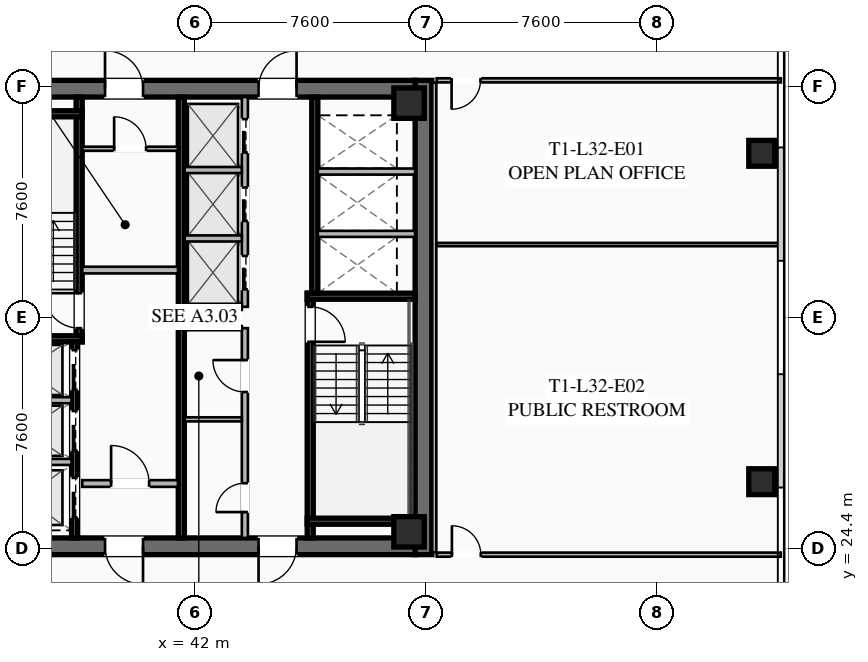
"""IFC4 building model, lengths in metres.
Left out: names, types, materials, properties, quantities, classifications, styles, units other than length and angle.
Written with IfcOpenShell. Run it as: python <this file> out.ifc"""

import sys

from ifc_helpers import new_model, si_unit, direction, frame, frame_2d, origin, origin_2d, place, context, subcontext, project, spatial, rectangle, hollow_rectangle, extrude, element, fill, save


model = new_model("IFC4")
c1 = context("Model", 3, precision=1e-05, world=origin(), true_north=direction((0.0, 1.0)))
c2 = subcontext(c1, "Body", "Model", "MODEL_VIEW")
j1 = project(units=[si_unit("LENGTHUNIT", "METRE"), si_unit("PLANEANGLEUNIT", "RADIAN")], contexts=[c1])
p1 = place(None, origin())
s1 = spatial("IfcSite", under=j1, at=p1, CompositionType="ELEMENT")
p2 = place(p1, origin())
s2 = spatial("IfcBuilding", under=s1, at=p2, CompositionType="ELEMENT")
p3 = place(p2, frame((0.0, 0.0, 121.5)))
s3 = spatial("IfcBuildingStorey", under=s2, at=p3, CompositionType="ELEMENT", Elevation=121.5)
p4 = place(p3, frame((49.525, 39.8, 0.0), z_axis=(0.0, 0.0, 1.0), x_axis=(0.0, -1.0, 0.0)))
e1 = element("IfcWall", 1, at=p4, inside=s3, PredefinedType="SHEAR", context=c2, shape_type="SweptSolid", body=[
    extrude(rectangle(XDim=15.6, YDim=0.55, at=frame_2d((7.8, 0.0))), origin(), (0.0, 0.0, 1.0), 3.55),
])
p5 = place(p3, frame((49.25, 24.475, 0.0), z_axis=(0.0, 0.0, 1.0), x_axis=(-1.0, 0.0, 0.0)))
e2 = element("IfcWall", 2, at=p5, inside=s3, PredefinedType="SHEAR", context=c2, shape_type="SweptSolid", body=[
    extrude(rectangle(XDim=14.5, YDim=0.55, at=frame_2d((7.25, 0.0))), origin(), (0.0, 0.0, 1.0), 3.55),
])
p6 = place(p5, frame((8.95, 0.0, 0.0)))
e3 = element("IfcOpeningElement", 3, at=p6, cuts=e2, PredefinedType="OPENING", context=c2, shape_type="SweptSolid", body=[
    extrude(rectangle(XDim=1.25, YDim=2.25, at=frame_2d((0.625, 1.125))), frame((0.0, 0.285, 0.0), z_axis=(0.0, -1.0, 0.0), x_axis=(1.0, 0.0, 0.0)), (0.0, 0.0, 1.0), 0.57),
])
p7 = place(p5, frame((3.9, 0.0, 0.0)))
e4 = element("IfcOpeningElement", 4, at=p7, cuts=e2, PredefinedType="OPENING", context=c2, shape_type="SweptSolid", body=[
    extrude(rectangle(XDim=1.25, YDim=2.25, at=frame_2d((0.625, 1.125))), frame((0.0, 0.285, 0.0), z_axis=(0.0, -1.0, 0.0), x_axis=(1.0, 0.0, 0.0)), (0.0, 0.0, 1.0), 0.57),
])
p8 = place(p3, frame((34.75, 39.525, 0.0), z_axis=(0.0, 0.0, 1.0), x_axis=(1.0, 0.0, 0.0)))
e5 = element("IfcWall", 5, at=p8, inside=s3, PredefinedType="SHEAR", context=c2, shape_type="SweptSolid", body=[
    extrude(rectangle(XDim=14.5, YDim=0.55, at=frame_2d((7.25, 0.0))), origin(), (0.0, 0.0, 1.0), 3.55),
])
p9 = place(p8, frame((4.3, 0.0, 0.0)))
e6 = element("IfcOpeningElement", 6, at=p9, cuts=e5, PredefinedType="OPENING", context=c2, shape_type="SweptSolid", body=[
    extrude(rectangle(XDim=1.25, YDim=2.25, at=frame_2d((0.625, 1.125))), frame((0.0, 0.285, 0.0), z_axis=(0.0, -1.0, 0.0), x_axis=(1.0, 0.0, 0.0)), (0.0, 0.0, 1.0), 0.57),
])
p10 = place(p8, frame((9.35, 0.0, 0.0)))
e7 = element("IfcOpeningElement", 7, at=p10, cuts=e5, PredefinedType="OPENING", context=c2, shape_type="SweptSolid", body=[
    extrude(rectangle(XDim=1.25, YDim=2.25, at=frame_2d((0.625, 1.125))), frame((0.0, 0.285, 0.0), z_axis=(0.0, -1.0, 0.0), x_axis=(1.0, 0.0, 0.0)), (0.0, 0.0, 1.0), 0.57),
])
for number, where, z_axis, x_axis in (
    (8, (49.05, 24.95, 0.0), (0.0, 0.0, 1.0), (1.0, 0.0, 0.0)),
    (9, (49.05, 39.05, 0.0), (0.0, 0.0, 1.0), (1.0, 0.0, 0.0)),
):
    element("IfcColumn", number, at=place(p3, frame(where, z_axis=z_axis, x_axis=x_axis)), inside=s3, PredefinedType="COLUMN", context=c2, shape_type="SweptSolid", body=[
        extrude(hollow_rectangle(XDim=1.0, YDim=1.0, WallThickness=0.04, at=origin_2d()), origin(), (0.0, 0.0, 1.0), 3.37),
    ])
for number, where, z_axis, x_axis in (
    (10, (60.65, 26.6, 0.0), (0.0, 0.0, 1.0), (1.0, 0.0, 0.0)),
    (11, (60.65, 37.4, 0.0), (0.0, 0.0, 1.0), (1.0, 0.0, 0.0)),
):
    element("IfcColumn", number, at=place(p3, frame(where, z_axis=z_axis, x_axis=x_axis)), inside=s3, PredefinedType="COLUMN", context=c2, shape_type="SweptSolid", body=[
        extrude(hollow_rectangle(XDim=0.85, YDim=0.85, WallThickness=0.035, at=origin_2d()), origin(), (0.0, 0.0, 1.0), 3.37),
    ])
p11 = place(p3, frame((38.2, 31.2, 0.0), z_axis=(0.0, 0.0, 1.0), x_axis=(0.0, 1.0, 0.0)))
e12 = element("IfcWall", 12, at=p11, inside=s3, PredefinedType="SHEAR", context=c2, shape_type="SweptSolid", body=[
    extrude(rectangle(XDim=8.05, YDim=0.2, at=frame_2d((4.025, 0.0))), origin(), (0.0, 0.0, 1.0), 3.37),
])
p12 = place(p11, frame((0.45, 0.0, 0.0)))
e13 = element("IfcOpeningElement", 13, at=p12, cuts=e12, PredefinedType="OPENING", context=c2, shape_type="SweptSolid", body=[
    extrude(rectangle(XDim=1.15, YDim=2.2, at=frame_2d((0.575, 1.1))), frame((0.0, 0.11, 0.0), z_axis=(0.0, -1.0, 0.0), x_axis=(1.0, 0.0, 0.0)), (0.0, 0.0, 1.0), 0.22),
])
for number, where, z_axis, x_axis in (
    (14, (34.75, 31.3, 0.0), (0.0, 0.0, 1.0), (1.0, 0.0, 0.0)),
    (15, (34.75, 38.7, 0.0), (0.0, 0.0, 1.0), (1.0, 0.0, 0.0)),
):
    element("IfcWall", number, at=place(p3, frame(where, z_axis=z_axis, x_axis=x_axis)), inside=s3, PredefinedType="SHEAR", context=c2, shape_type="SweptSolid", body=[
        extrude(rectangle(XDim=3.55, YDim=0.2, at=frame_2d((1.775, 0.0))), origin(), (0.0, 0.0, 1.0), 3.37),
    ])
p13 = place(p3, frame((45.8, 32.8, 0.0), z_axis=(0.0, 0.0, 1.0), x_axis=(0.0, -1.0, 0.0)))
e16 = element("IfcWall", 16, at=p13, inside=s3, PredefinedType="SHEAR", context=c2, shape_type="SweptSolid", body=[
    extrude(rectangle(XDim=8.05, YDim=0.2, at=frame_2d((4.025, 0.0))), origin(), (0.0, 0.0, 1.0), 3.37),
])
p14 = place(p13, frame((0.45, 0.0, 0.0)))
e17 = element("IfcOpeningElement", 17, at=p14, cuts=e16, PredefinedType="OPENING", context=c2, shape_type="SweptSolid", body=[
    extrude(rectangle(XDim=1.15, YDim=2.2, at=frame_2d((0.575, 1.1))), frame((0.0, 0.11, 0.0), z_axis=(0.0, -1.0, 0.0), x_axis=(1.0, 0.0, 0.0)), (0.0, 0.0, 1.0), 0.22),
])
for number, where, z_axis, x_axis in (
    (18, (45.7, 32.7, 0.0), (0.0, 0.0, 1.0), (1.0, 0.0, 0.0)),
    (19, (45.7, 25.3, 0.0), (0.0, 0.0, 1.0), (1.0, 0.0, 0.0)),
):
    element("IfcWall", number, at=place(p3, frame(where, z_axis=z_axis, x_axis=x_axis)), inside=s3, PredefinedType="SHEAR", context=c2, shape_type="SweptSolid", body=[
        extrude(rectangle(XDim=3.55, YDim=0.2, at=frame_2d((1.775, 0.0))), origin(), (0.0, 0.0, 1.0), 3.37),
    ])
p15 = place(p3, frame((41.56, 24.75, 0.0), z_axis=(0.0, 0.0, 1.0), x_axis=(0.0, 1.0, 0.0)))
e20 = element("IfcWall", 20, at=p15, inside=s3, PredefinedType="SHEAR", context=c2, shape_type="SweptSolid", body=[
    extrude(rectangle(XDim=14.5, YDim=0.2, at=frame_2d((7.25, 0.0))), origin(), (0.0, 0.0, 1.0), 3.37),
])
p16 = place(p3, frame((38.3, 33.56, 0.0), z_axis=(0.0, 0.0, 1.0), x_axis=(1.0, 0.0, 0.0)))
e21 = element("IfcWall", 21, at=p16, inside=s3, PredefinedType="SOLIDWALL", context=c2, shape_type="SweptSolid", body=[
    extrude(rectangle(XDim=3.15, YDim=0.22, at=frame_2d((1.575, 0.0))), origin(), (0.0, 0.0, 1.0), 2.723),
])
p17 = place(p3, frame((38.3, 26.54, 0.0), z_axis=(0.0, 0.0, 1.0), x_axis=(1.0, 0.0, 0.0)))
e22 = element("IfcWall", 22, at=p17, inside=s3, PredefinedType="SOLIDWALL", context=c2, shape_type="SweptSolid", body=[
    extrude(rectangle(XDim=3.15, YDim=0.22, at=frame_2d((1.575, 0.0))), origin(), (0.0, 0.0, 1.0), 2.723),
])
p18 = place(p17, frame((0.95, 0.0, 0.0)))
e23 = element("IfcOpeningElement", 23, at=p18, cuts=e22, PredefinedType="OPENING", context=c2, shape_type="SweptSolid", body=[
    extrude(rectangle(XDim=1.25, YDim=2.25, at=frame_2d((0.625, 1.125))), frame((0.0, 0.12, 0.0), z_axis=(0.0, -1.0, 0.0), x_axis=(1.0, 0.0, 0.0)), (0.0, 0.0, 1.0), 0.24),
])
p19 = place(p3, frame((38.05, 24.75, 0.0), z_axis=(0.0, 0.0, 1.0), x_axis=(0.0, 1.0, 0.0)))
e24 = element("IfcWall", 24, at=p19, inside=s3, PredefinedType="SHEAR", context=c2, shape_type="SweptSolid", body=[
    extrude(rectangle(XDim=6.45, YDim=0.2, at=frame_2d((3.225, 0.0))), origin(), (0.0, 0.0, 1.0), 3.37),
])
p20 = place(p19, frame((4.875, 0.0, 0.0)))
e25 = element("IfcOpeningElement", 25, at=p20, cuts=e24, PredefinedType="OPENING", context=c2, shape_type="SweptSolid", body=[
    extrude(rectangle(XDim=1.3, YDim=2.25, at=frame_2d((0.65, 1.125))), frame((0.0, 0.11, 0.0), z_axis=(0.0, -1.0, 0.0), x_axis=(1.0, 0.0, 0.0)), (0.0, 0.0, 1.0), 0.22),
])
p21 = place(p19, frame((2.875, 0.0, 0.0)))
e26 = element("IfcOpeningElement", 26, at=p21, cuts=e24, PredefinedType="OPENING", context=c2, shape_type="SweptSolid", body=[
    extrude(rectangle(XDim=1.3, YDim=2.25, at=frame_2d((0.65, 1.125))), frame((0.0, 0.11, 0.0), z_axis=(0.0, -1.0, 0.0), x_axis=(1.0, 0.0, 0.0)), (0.0, 0.0, 1.0), 0.22),
])
p22 = place(p19, frame((0.675, 0.0, 0.0)))
e27 = element("IfcOpeningElement", 27, at=p22, cuts=e24, PredefinedType="OPENING", context=c2, shape_type="SweptSolid", body=[
    extrude(rectangle(XDim=1.3, YDim=2.25, at=frame_2d((0.65, 1.125))), frame((0.0, 0.11, 0.0), z_axis=(0.0, -1.0, 0.0), x_axis=(1.0, 0.0, 0.0)), (0.0, 0.0, 1.0), 0.22),
])
for number, where, z_axis, x_axis in (
    (28, (34.75, 27.25, 0.0), (0.0, 0.0, 1.0), (1.0, 0.0, 0.0)),
    (29, (34.75, 29.28, 0.0), (0.0, 0.0, 1.0), (1.0, 0.0, 0.0)),
):
    element("IfcWall", number, at=place(p3, frame(where, z_axis=z_axis, x_axis=x_axis)), inside=s3, PredefinedType="SOLIDWALL", context=c2, shape_type="SweptSolid", body=[
        extrude(rectangle(XDim=3.2, YDim=0.2, at=frame_2d((1.6, 0.0))), origin(), (0.0, 0.0, 1.0), 3.37),
    ])
p23 = place(p3, frame((45.95, 39.25, 0.0), z_axis=(0.0, 0.0, 1.0), x_axis=(0.0, -1.0, 0.0)))
e30 = element("IfcWall", 30, at=p23, inside=s3, PredefinedType="SHEAR", context=c2, shape_type="SweptSolid", body=[
    extrude(rectangle(XDim=6.45, YDim=0.2, at=frame_2d((3.225, 0.0))), origin(), (0.0, 0.0, 1.0), 3.37),
])
for number, where, z_axis, x_axis in (
    (31, (46.05, 34.75, 0.0), (0.0, 0.0, 1.0), (1.0, 0.0, 0.0)),
    (32, (46.05, 36.8, 0.0), (0.0, 0.0, 1.0), (1.0, 0.0, 0.0)),
):
    element("IfcWall", number, at=place(p3, frame(where, z_axis=z_axis, x_axis=x_axis)), inside=s3, PredefinedType="SOLIDWALL", context=c2, shape_type="SweptSolid", body=[
        extrude(rectangle(XDim=3.2, YDim=0.2, at=frame_2d((1.6, 0.0))), origin(), (0.0, 0.0, 1.0), 3.37),
    ])
p24 = place(p3, frame((38.3, 37.55, 0.0), z_axis=(0.0, 0.0, 1.0), x_axis=(1.0, 0.0, 0.0)))
e33 = element("IfcWall", 33, at=p24, inside=s3, PredefinedType="PARTITIONING", context=c2, shape_type="SweptSolid", body=[
    extrude(rectangle(XDim=3.15, YDim=0.135, at=frame_2d((1.575, 0.0))), origin(), (0.0, 0.0, 1.0), 2.723),
])
p25 = place(p24, frame((1.05, 0.0, 0.0)))
e34 = element("IfcOpeningElement", 34, at=p25, cuts=e33, PredefinedType="OPENING", context=c2, shape_type="SweptSolid", body=[
    extrude(rectangle(XDim=1.05, YDim=2.2, at=frame_2d((0.525, 1.1))), frame((0.0, 0.077, 0.0), z_axis=(0.0, -1.0, 0.0), x_axis=(1.0, 0.0, 0.0)), (0.0, 0.0, 1.0), 0.155),
])
p26 = place(p3, frame((43.65, 24.75, 0.0), z_axis=(0.0, 0.0, 1.0), x_axis=(0.0, 1.0, 0.0)))
e35 = element("IfcWall", 35, at=p26, inside=s3, PredefinedType="SOLIDWALL", context=c2, shape_type="SweptSolid", body=[
    extrude(rectangle(XDim=6.9, YDim=0.2, at=frame_2d((3.45, 0.0))), origin(), (0.0, 0.0, 1.0), 2.723),
])
p27 = place(p26, frame((0.85, 0.0, 0.0)))
e36 = element("IfcOpeningElement", 36, at=p27, cuts=e35, PredefinedType="OPENING", context=c2, shape_type="SweptSolid", body=[
    extrude(rectangle(XDim=0.95, YDim=2.05, at=frame_2d((0.475, 1.025))), frame((0.0, 0.11, 0.0), z_axis=(0.0, -1.0, 0.0), x_axis=(1.0, 0.0, 0.0)), (0.0, 0.0, 1.0), 0.22),
])
p28 = place(p26, frame((4.8, 0.0, 0.0)))
e37 = element("IfcOpeningElement", 37, at=p28, cuts=e35, PredefinedType="OPENING", context=c2, shape_type="SweptSolid", body=[
    extrude(rectangle(XDim=1.05, YDim=2.2, at=frame_2d((0.525, 1.1))), frame((0.0, 0.11, 0.0), z_axis=(0.0, -1.0, 0.0), x_axis=(1.0, 0.0, 0.0)), (0.0, 0.0, 1.0), 0.22),
])
for number, where, z_axis, x_axis in (
    (38, (41.67, 31.65, 0.0), (0.0, 0.0, 1.0), (1.0, 0.0, 0.0)),
    (39, (41.67, 28.65, 0.0), (0.0, 0.0, 1.0), (1.0, 0.0, 0.0)),
):
    element("IfcWall", number, at=place(p3, frame(where, z_axis=z_axis, x_axis=x_axis)), inside=s3, PredefinedType="PARTITIONING", context=c2, shape_type="SweptSolid", body=[
        extrude(rectangle(XDim=1.88, YDim=0.135, at=frame_2d((0.94, 0.0))), origin(), (0.0, 0.0, 1.0), 2.723),
    ])
p29 = place(p3, frame((43.65, 32.35, 0.0), z_axis=(0.0, 0.0, 1.0), x_axis=(0.0, 1.0, 0.0)))
e40 = element("IfcWall", 40, at=p29, inside=s3, PredefinedType="SOLIDWALL", context=c2, shape_type="SweptSolid", body=[
    extrude(rectangle(XDim=6.9, YDim=0.2, at=frame_2d((3.45, 0.0))), origin(), (0.0, 0.0, 1.0), 3.37),
])
p30 = place(p29, frame((0.575, 0.0, 0.0)))
e41 = element("IfcOpeningElement", 41, at=p30, cuts=e40, PredefinedType="OPENING", context=c2, shape_type="SweptSolid", body=[
    extrude(rectangle(XDim=1.1, YDim=2.2, at=frame_2d((0.55, 1.1))), frame((0.0, 0.11, 0.0), z_axis=(0.0, -1.0, 0.0), x_axis=(1.0, 0.0, 0.0)), (0.0, 0.0, 1.0), 0.22),
])
p31 = place(p29, frame((2.825, 0.0, 0.0)))
e42 = element("IfcOpeningElement", 42, at=p31, cuts=e40, PredefinedType="OPENING", context=c2, shape_type="SweptSolid", body=[
    extrude(rectangle(XDim=1.1, YDim=2.2, at=frame_2d((0.55, 1.1))), frame((0.0, 0.11, 0.0), z_axis=(0.0, -1.0, 0.0), x_axis=(1.0, 0.0, 0.0)), (0.0, 0.0, 1.0), 0.22),
])
p32 = place(p29, frame((5.075, 0.0, 0.0)))
e43 = element("IfcOpeningElement", 43, at=p32, cuts=e40, PredefinedType="OPENING", context=c2, shape_type="SweptSolid", body=[
    extrude(rectangle(XDim=1.1, YDim=2.2, at=frame_2d((0.55, 1.1))), frame((0.0, 0.11, 0.0), z_axis=(0.0, -1.0, 0.0), x_axis=(1.0, 0.0, 0.0)), (0.0, 0.0, 1.0), 0.22),
])
for number, where, z_axis, x_axis in (
    (44, (41.67, 32.35, 0.0), (0.0, 0.0, 1.0), (1.0, 0.0, 0.0)),
    (45, (41.67, 34.6, 0.0), (0.0, 0.0, 1.0), (1.0, 0.0, 0.0)),
    (46, (41.67, 36.85, 0.0), (0.0, 0.0, 1.0), (1.0, 0.0, 0.0)),
):
    element("IfcWall", number, at=place(p3, frame(where, z_axis=z_axis, x_axis=x_axis)), inside=s3, PredefinedType="SOLIDWALL", context=c2, shape_type="SweptSolid", body=[
        extrude(rectangle(XDim=1.88, YDim=0.2, at=frame_2d((0.94, 0.0))), origin(), (0.0, 0.0, 1.0), 3.37),
    ])
p33 = place(p3, frame((49.88, 39.72, 0.0), z_axis=(0.0, 0.0, 1.0), x_axis=(0.0, -1.0, 0.0)))
e47 = element("IfcWall", 47, at=p33, inside=s3, PredefinedType="PARTITIONING", context=c2, shape_type="SweptSolid", body=[
    extrude(rectangle(XDim=15.44, YDim=0.135, at=frame_2d((7.72, 0.0))), origin(), (0.0, 0.0, 1.0), 2.723),
])
p34 = place(p3, frame((61.28, 39.8, 0.0), z_axis=(0.0, 0.0, 1.0), x_axis=(-1.0, 0.0, 0.0)))
e48 = element("IfcWall", 48, at=p34, inside=s3, PredefinedType="PARTITIONING", context=c2, shape_type="SweptSolid", body=[
    extrude(rectangle(XDim=11.32, YDim=0.135, at=frame_2d((5.66, 0.0))), origin(), (0.0, 0.0, 1.0), 2.723),
])
p35 = place(p34, frame((9.88, 0.0, 0.0)))
e49 = element("IfcOpeningElement", 49, at=p35, cuts=e48, PredefinedType="OPENING", context=c2, shape_type="SweptSolid", body=[
    extrude(rectangle(XDim=0.95, YDim=2.05, at=frame_2d((0.475, 1.025))), frame((0.0, 0.077, 0.0), z_axis=(0.0, -1.0, 0.0), x_axis=(1.0, 0.0, 0.0)), (0.0, 0.0, 1.0), 0.155),
])
p36 = place(p3, frame((49.96, 24.2, 0.0), z_axis=(0.0, 0.0, 1.0), x_axis=(1.0, 0.0, 0.0)))
e50 = element("IfcWall", 50, at=p36, inside=s3, PredefinedType="PARTITIONING", context=c2, shape_type="SweptSolid", body=[
    extrude(rectangle(XDim=11.32, YDim=0.135, at=frame_2d((5.66, 0.0))), origin(), (0.0, 0.0, 1.0), 2.723),
])
p37 = place(p36, frame((0.5, 0.0, 0.0)))
e51 = element("IfcOpeningElement", 51, at=p37, cuts=e50, PredefinedType="OPENING", context=c2, shape_type="SweptSolid", body=[
    extrude(rectangle(XDim=0.95, YDim=2.05, at=frame_2d((0.475, 1.025))), frame((0.0, 0.077, 0.0), z_axis=(0.0, -1.0, 0.0), x_axis=(1.0, 0.0, 0.0)), (0.0, 0.0, 1.0), 0.155),
])
p38 = place(p3, frame((49.96, 34.4, 0.0), z_axis=(0.0, 0.0, 1.0), x_axis=(1.0, 0.0, 0.0)))
e52 = element("IfcWall", 52, at=p38, inside=s3, PredefinedType="PARTITIONING", context=c2, shape_type="SweptSolid", body=[
    extrude(rectangle(XDim=11.32, YDim=0.11, at=frame_2d((5.66, 0.0))), origin(), (0.0, 0.0, 1.0), 2.723),
])
p39 = place(p9, origin())
e53 = element("IfcDoor", 53, at=p39, inside=s3, OperationType="SINGLE_SWING_LEFT", PredefinedType="DOOR", context=c2, shape_type="SweptSolid", body=[
    extrude(rectangle(XDim=1.25, YDim=2.25, at=frame_2d((0.625, 1.125))), frame((0.0, 0.025, 0.0), z_axis=(0.0, -1.0, 0.0), x_axis=(1.0, 0.0, 0.0)), (0.0, 0.0, 1.0), 0.05),
])
fill(e6, e53)
p40 = place(p10, origin())
e54 = element("IfcDoor", 54, at=p40, inside=s3, OperationType="SINGLE_SWING_RIGHT", PredefinedType="DOOR", context=c2, shape_type="SweptSolid", body=[
    extrude(rectangle(XDim=1.25, YDim=2.25, at=frame_2d((0.625, 1.125))), frame((0.0, 0.025, 0.0), z_axis=(0.0, -1.0, 0.0), x_axis=(1.0, 0.0, 0.0)), (0.0, 0.0, 1.0), 0.05),
])
fill(e7, e54)
p41 = place(p6, origin())
e55 = element("IfcDoor", 55, at=p41, inside=s3, OperationType="SINGLE_SWING_LEFT", PredefinedType="DOOR", context=c2, shape_type="SweptSolid", body=[
    extrude(rectangle(XDim=1.25, YDim=2.25, at=frame_2d((0.625, 1.125))), frame((0.0, 0.025, 0.0), z_axis=(0.0, -1.0, 0.0), x_axis=(1.0, 0.0, 0.0)), (0.0, 0.0, 1.0), 0.05),
])
fill(e3, e55)
p42 = place(p7, origin())
e56 = element("IfcDoor", 56, at=p42, inside=s3, OperationType="SINGLE_SWING_RIGHT", PredefinedType="DOOR", context=c2, shape_type="SweptSolid", body=[
    extrude(rectangle(XDim=1.25, YDim=2.25, at=frame_2d((0.625, 1.125))), frame((0.0, 0.025, 0.0), z_axis=(0.0, -1.0, 0.0), x_axis=(1.0, 0.0, 0.0)), (0.0, 0.0, 1.0), 0.05),
])
fill(e4, e56)
p43 = place(p12, origin())
e57 = element("IfcDoor", 57, at=p43, inside=s3, OperationType="SINGLE_SWING_RIGHT", PredefinedType="DOOR", context=c2, shape_type="SweptSolid", body=[
    extrude(rectangle(XDim=1.15, YDim=2.2, at=frame_2d((0.575, 1.1))), frame((0.0, 0.025, 0.0), z_axis=(0.0, -1.0, 0.0), x_axis=(1.0, 0.0, 0.0)), (0.0, 0.0, 1.0), 0.05),
])
fill(e13, e57)
p44 = place(p14, origin())
e58 = element("IfcDoor", 58, at=p44, inside=s3, OperationType="SINGLE_SWING_RIGHT", PredefinedType="DOOR", context=c2, shape_type="SweptSolid", body=[
    extrude(rectangle(XDim=1.15, YDim=2.2, at=frame_2d((0.575, 1.1))), frame((0.0, 0.025, 0.0), z_axis=(0.0, -1.0, 0.0), x_axis=(1.0, 0.0, 0.0)), (0.0, 0.0, 1.0), 0.05),
])
fill(e17, e58)
p45 = place(p18, origin())
e59 = element("IfcDoor", 59, at=p45, inside=s3, OperationType="SINGLE_SWING_LEFT", PredefinedType="DOOR", context=c2, shape_type="SweptSolid", body=[
    extrude(rectangle(XDim=1.25, YDim=2.25, at=frame_2d((0.625, 1.125))), frame((0.0, 0.025, 0.0), z_axis=(0.0, -1.0, 0.0), x_axis=(1.0, 0.0, 0.0)), (0.0, 0.0, 1.0), 0.05),
])
fill(e23, e59)
p46 = place(p25, origin())
e60 = element("IfcDoor", 60, at=p46, inside=s3, OperationType="SINGLE_SWING_LEFT", PredefinedType="DOOR", context=c2, shape_type="SweptSolid", body=[
    extrude(rectangle(XDim=1.05, YDim=2.2, at=frame_2d((0.525, 1.1))), frame((0.0, 0.025, 0.0), z_axis=(0.0, -1.0, 0.0), x_axis=(1.0, 0.0, 0.0)), (0.0, 0.0, 1.0), 0.05),
])
fill(e34, e60)
p47 = place(p27, origin())
e61 = element("IfcDoor", 61, at=p47, inside=s3, OperationType="SINGLE_SWING_LEFT", PredefinedType="DOOR", context=c2, shape_type="SweptSolid", body=[
    extrude(rectangle(XDim=0.95, YDim=2.05, at=frame_2d((0.475, 1.025))), frame((0.0, 0.025, 0.0), z_axis=(0.0, -1.0, 0.0), x_axis=(1.0, 0.0, 0.0)), (0.0, 0.0, 1.0), 0.05),
])
fill(e36, e61)
p48 = place(p28, origin())
e62 = element("IfcDoor", 62, at=p48, inside=s3, OperationType="SINGLE_SWING_RIGHT", PredefinedType="DOOR", context=c2, shape_type="SweptSolid", body=[
    extrude(rectangle(XDim=1.05, YDim=2.2, at=frame_2d((0.525, 1.1))), frame((0.0, 0.025, 0.0), z_axis=(0.0, -1.0, 0.0), x_axis=(1.0, 0.0, 0.0)), (0.0, 0.0, 1.0), 0.05),
])
fill(e37, e62)
p49 = place(p35, origin())
e63 = element("IfcDoor", 63, at=p49, inside=s3, OperationType="SINGLE_SWING_RIGHT", PredefinedType="DOOR", context=c2, shape_type="SweptSolid", body=[
    extrude(rectangle(XDim=0.95, YDim=2.05, at=frame_2d((0.475, 1.025))), frame((0.0, 0.025, 0.0), z_axis=(0.0, -1.0, 0.0), x_axis=(1.0, 0.0, 0.0)), (0.0, 0.0, 1.0), 0.05),
])
fill(e49, e63)
p50 = place(p37, origin())
e64 = element("IfcDoor", 64, at=p50, inside=s3, OperationType="SINGLE_SWING_LEFT", PredefinedType="DOOR", context=c2, shape_type="SweptSolid", body=[
    extrude(rectangle(XDim=0.95, YDim=2.05, at=frame_2d((0.475, 1.025))), frame((0.0, 0.025, 0.0), z_axis=(0.0, -1.0, 0.0), x_axis=(1.0, 0.0, 0.0)), (0.0, 0.0, 1.0), 0.05),
])
fill(e51, e64)
p51 = place(p20, origin())
e65 = element("IfcDoor", 65, at=p51, inside=s3, OperationType="SLIDING_TO_LEFT", PredefinedType="DOOR", context=c2, shape_type="SweptSolid", body=[
    extrude(rectangle(XDim=1.3, YDim=2.25, at=frame_2d((0.65, 1.125))), frame((0.0, 0.025, 0.0), z_axis=(0.0, -1.0, 0.0), x_axis=(1.0, 0.0, 0.0)), (0.0, 0.0, 1.0), 0.05),
])
fill(e25, e65)
p52 = place(p21, origin())
e66 = element("IfcDoor", 66, at=p52, inside=s3, OperationType="SLIDING_TO_LEFT", PredefinedType="DOOR", context=c2, shape_type="SweptSolid", body=[
    extrude(rectangle(XDim=1.3, YDim=2.25, at=frame_2d((0.65, 1.125))), frame((0.0, 0.025, 0.0), z_axis=(0.0, -1.0, 0.0), x_axis=(1.0, 0.0, 0.0)), (0.0, 0.0, 1.0), 0.05),
])
fill(e26, e66)
p53 = place(p22, origin())
e67 = element("IfcDoor", 67, at=p53, inside=s3, OperationType="SLIDING_TO_LEFT", PredefinedType="DOOR", context=c2, shape_type="SweptSolid", body=[
    extrude(rectangle(XDim=1.3, YDim=2.25, at=frame_2d((0.65, 1.125))), frame((0.0, 0.025, 0.0), z_axis=(0.0, -1.0, 0.0), x_axis=(1.0, 0.0, 0.0)), (0.0, 0.0, 1.0), 0.05),
])
fill(e27, e67)
p54 = place(p30, origin())
e68 = element("IfcDoor", 68, at=p54, inside=s3, OperationType="SLIDING_TO_LEFT", PredefinedType="DOOR", context=c2, shape_type="SweptSolid", body=[
    extrude(rectangle(XDim=1.1, YDim=2.2, at=frame_2d((0.55, 1.1))), frame((0.0, 0.025, 0.0), z_axis=(0.0, -1.0, 0.0), x_axis=(1.0, 0.0, 0.0)), (0.0, 0.0, 1.0), 0.05),
])
fill(e41, e68)
p55 = place(p31, origin())
e69 = element("IfcDoor", 69, at=p55, inside=s3, OperationType="SLIDING_TO_LEFT", PredefinedType="DOOR", context=c2, shape_type="SweptSolid", body=[
    extrude(rectangle(XDim=1.1, YDim=2.2, at=frame_2d((0.55, 1.1))), frame((0.0, 0.025, 0.0), z_axis=(0.0, -1.0, 0.0), x_axis=(1.0, 0.0, 0.0)), (0.0, 0.0, 1.0), 0.05),
])
fill(e42, e69)
p56 = place(p32, origin())
e70 = element("IfcDoor", 70, at=p56, inside=s3, OperationType="SLIDING_TO_LEFT", PredefinedType="DOOR", context=c2, shape_type="SweptSolid", body=[
    extrude(rectangle(XDim=1.1, YDim=2.2, at=frame_2d((0.55, 1.1))), frame((0.0, 0.025, 0.0), z_axis=(0.0, -1.0, 0.0), x_axis=(1.0, 0.0, 0.0)), (0.0, 0.0, 1.0), 0.05),
])
fill(e43, e70)
save(model, sys.argv[1])
